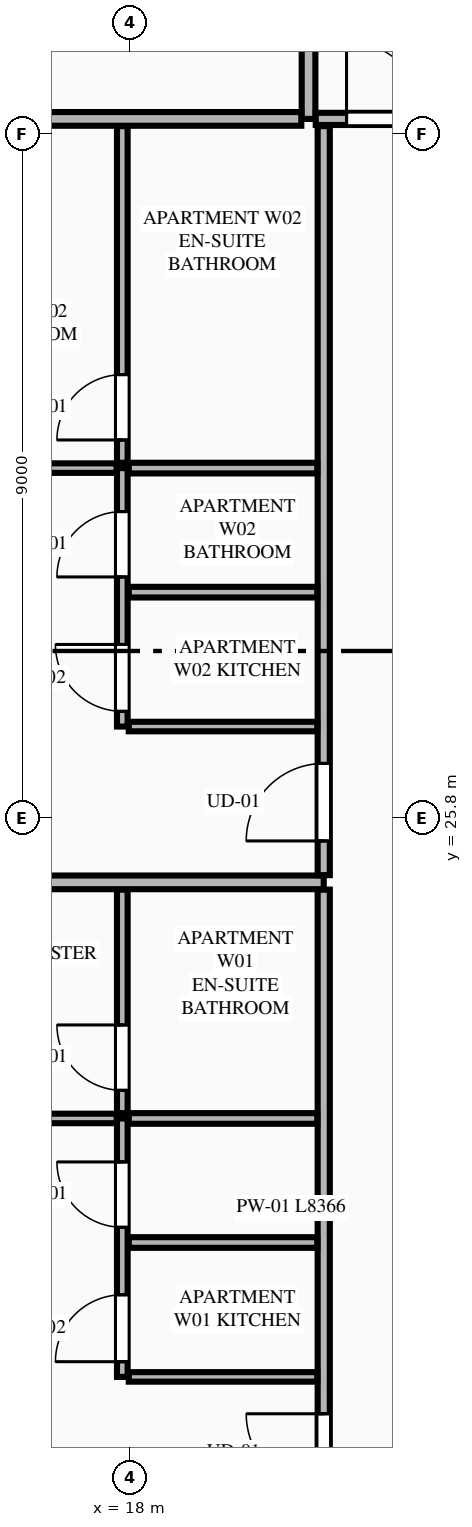
"""IFC4 building model, lengths in metres.
Left out: names, types, materials, properties, quantities, classifications, styles, units other than length and angle.
Written with IfcOpenShell. Run it as: python <this file> out.ifc"""

import sys

from ifc_helpers import new_model, si_unit, direction, frame, frame_2d, origin, place, context, subcontext, project, spatial, rectangle, extrude, element, fill, save


model = new_model("IFC4")
c1 = context("Model", 3, precision=1e-05, world=origin(), true_north=direction((0.0, 1.0)))
c2 = subcontext(c1, "Body", "Model", "MODEL_VIEW")
j1 = project(units=[si_unit("LENGTHUNIT", "METRE"), si_unit("PLANEANGLEUNIT", "RADIAN")], contexts=[c1])
p1 = place(None, origin())
s1 = spatial("IfcSite", under=j1, at=p1, CompositionType="ELEMENT")
p2 = place(p1, origin())
s2 = spatial("IfcBuilding", under=s1, at=p2, CompositionType="ELEMENT")
p3 = place(p2, frame((0.0, 0.0, 256.2)))
s3 = spatial("IfcBuildingStorey", under=s2, at=p3, CompositionType="ELEMENT", Elevation=256.2)
p4 = place(p3, frame((20.35, 35.0, 0.0), z_axis=(0.0, 0.0, 1.0), x_axis=(0.0, 1.0, 0.0)))
e1 = element("IfcWall", 1, at=p4, inside=s3, PredefinedType="PARTITIONING", context=c2, shape_type="SweptSolid", body=[
    extrude(rectangle(XDim=8.481, YDim=0.18, at=frame_2d((4.24, 0.0))), origin(), (0.0, 0.0, 1.0), 3.45),
])
p5 = place(p3, frame((20.445, 35.0, 0.0), z_axis=(0.0, 0.0, 1.0), x_axis=(1.0, 0.0, 0.0)))
e2 = element("IfcWall", 2, at=p5, inside=s3, PredefinedType="PARTITIONING", context=c2, shape_type="SweptSolid", body=[
    extrude(rectangle(XDim=15.114, YDim=0.16, at=frame_2d((7.557, 0.0))), origin(), (0.0, 0.0, 1.0), 3.45),
])
p6 = place(p5, frame((0.405, 0.0, 0.0)))
e3 = element("IfcOpeningElement", 3, at=p6, cuts=e2, PredefinedType="OPENING", context=c2, shape_type="SweptSolid", body=[
    extrude(rectangle(XDim=1.02, YDim=2.25, at=frame_2d((0.51, 1.125))), frame((0.0, 0.09, 0.0), z_axis=(0.0, -1.0, 0.0), x_axis=(1.0, 0.0, 0.0)), (0.0, 0.0, 1.0), 0.18),
])
p7 = place(p3, frame((15.933, 35.0, 0.0), z_axis=(0.0, 0.0, 1.0), x_axis=(1.0, 0.0, 0.0)))
e4 = element("IfcWall", 4, at=p7, inside=s3, PredefinedType="PARTITIONING", context=c2, shape_type="SweptSolid", body=[
    extrude(rectangle(XDim=4.322, YDim=0.18, at=frame_2d((2.161, 0.0))), origin(), (0.0, 0.0, 1.0), 3.45),
])
p8 = place(p3, frame((20.55, 16.495, 0.0), z_axis=(0.0, 0.0, 1.0), x_axis=(0.0, 1.0, 0.0)))
e5 = element("IfcWall", 5, at=p8, inside=s3, PredefinedType="PARTITIONING", context=c2, shape_type="SweptSolid", body=[
    extrude(rectangle(XDim=8.366, YDim=0.16, at=frame_2d((4.183, 0.0))), origin(), (0.0, 0.0, 1.0), 3.137),
])
p9 = place(p8, frame((0.45, 0.0, 0.0)))
e6 = element("IfcOpeningElement", 6, at=p9, cuts=e5, PredefinedType="OPENING", context=c2, shape_type="SweptSolid", body=[
    extrude(rectangle(XDim=1.02, YDim=2.25, at=frame_2d((0.51, 1.125))), frame((0.0, 0.09, 0.0), z_axis=(0.0, -1.0, 0.0), x_axis=(1.0, 0.0, 0.0)), (0.0, 0.0, 1.0), 0.18),
])
p10 = place(p3, frame((17.985, 18.45, 0.0), z_axis=(0.0, 0.0, 1.0), x_axis=(1.0, 0.0, 0.0)))
e7 = element("IfcWall", 7, at=p10, inside=s3, PredefinedType="PARTITIONING", context=c2, shape_type="SweptSolid", body=[
    extrude(rectangle(XDim=2.48, YDim=0.125, at=frame_2d((1.24, 0.0))), origin(), (0.0, 0.0, 1.0), 3.45),
])
p11 = place(p3, frame((17.9, 18.45, 0.0), z_axis=(0.0, 0.0, 1.0), x_axis=(0.0, 1.0, 0.0)))
e8 = element("IfcWall", 8, at=p11, inside=s3, PredefinedType="PLUMBINGWALL", context=c2, shape_type="SweptSolid", body=[
    extrude(rectangle(XDim=3.4, YDim=0.14, at=frame_2d((1.7, 0.0))), origin(), (0.0, 0.0, 1.0), 3.45),
])
p12 = place(p11, frame((0.2, 0.0, 0.0)))
e9 = element("IfcOpeningElement", 9, at=p12, cuts=e8, PredefinedType="OPENING", context=c2, shape_type="SweptSolid", body=[
    extrude(rectangle(XDim=0.88, YDim=2.15, at=frame_2d((0.44, 1.075))), frame((0.0, 0.08, 0.0), z_axis=(0.0, -1.0, 0.0), x_axis=(1.0, 0.0, 0.0)), (0.0, 0.0, 1.0), 0.16),
])
p13 = place(p11, frame((1.968, 0.0, 0.0)))
e10 = element("IfcOpeningElement", 10, at=p13, cuts=e8, PredefinedType="OPENING", context=c2, shape_type="SweptSolid", body=[
    extrude(rectangle(XDim=0.86, YDim=2.1, at=frame_2d((0.43, 1.05))), frame((0.0, 0.08, 0.0), z_axis=(0.0, -1.0, 0.0), x_axis=(1.0, 0.0, 0.0)), (0.0, 0.0, 1.0), 0.16),
])
p14 = place(p3, frame((17.9, 21.92, 0.0), z_axis=(0.0, 0.0, 1.0), x_axis=(0.0, 1.0, 0.0)))
e11 = element("IfcWall", 11, at=p14, inside=s3, PredefinedType="PLUMBINGWALL", context=c2, shape_type="SweptSolid", body=[
    extrude(rectangle(XDim=2.941, YDim=0.14, at=frame_2d((1.471, 0.0))), origin(), (0.0, 0.0, 1.0), 3.45),
])
p15 = place(p14, frame((0.3, 0.0, 0.0)))
e12 = element("IfcOpeningElement", 12, at=p15, cuts=e11, PredefinedType="OPENING", context=c2, shape_type="SweptSolid", body=[
    extrude(rectangle(XDim=0.86, YDim=2.1, at=frame_2d((0.43, 1.05))), frame((0.0, 0.08, 0.0), z_axis=(0.0, -1.0, 0.0), x_axis=(1.0, 0.0, 0.0)), (0.0, 0.0, 1.0), 0.16),
])
p16 = place(p3, frame((17.985, 21.85, 0.0), z_axis=(0.0, 0.0, 1.0), x_axis=(1.0, 0.0, 0.0)))
e13 = element("IfcWall", 13, at=p16, inside=s3, PredefinedType="PLUMBINGWALL", context=c2, shape_type="SweptSolid", body=[
    extrude(rectangle(XDim=2.48, YDim=0.14, at=frame_2d((1.24, 0.0))), origin(), (0.0, 0.0, 1.0), 3.45),
])
p17 = place(p3, frame((13.262, 21.85, 0.0), z_axis=(0.0, 0.0, 1.0), x_axis=(1.0, 0.0, 0.0)))
e14 = element("IfcWall", 14, at=p17, inside=s3, PredefinedType="PARTITIONING", context=c2, shape_type="SweptSolid", body=[
    extrude(rectangle(XDim=4.563, YDim=0.125, at=frame_2d((2.281, 0.0))), origin(), (0.0, 0.0, 1.0), 3.45),
])
p18 = place(p17, frame((0.35, 0.0, 0.0)))
e15 = element("IfcOpeningElement", 15, at=p18, cuts=e14, PredefinedType="OPENING", context=c2, shape_type="SweptSolid", body=[
    extrude(rectangle(XDim=0.92, YDim=2.15, at=frame_2d((0.46, 1.075))), frame((0.0, 0.073, 0.0), z_axis=(0.0, -1.0, 0.0), x_axis=(1.0, 0.0, 0.0)), (0.0, 0.0, 1.0), 0.145),
])
p19 = place(p3, frame((17.985, 20.218, 0.0), z_axis=(0.0, 0.0, 1.0), x_axis=(1.0, 0.0, 0.0)))
e16 = element("IfcWall", 16, at=p19, inside=s3, PredefinedType="PLUMBINGWALL", context=c2, shape_type="SweptSolid", body=[
    extrude(rectangle(XDim=2.48, YDim=0.14, at=frame_2d((1.24, 0.0))), origin(), (0.0, 0.0, 1.0), 3.45),
])
p20 = place(p3, frame((11.707, 24.956, 0.0), z_axis=(0.0, 0.0, 1.0), x_axis=(1.0, 0.0, 0.0)))
e17 = element("IfcWall", 17, at=p20, inside=s3, PredefinedType="PARTITIONING", context=c2, shape_type="SweptSolid", body=[
    extrude(rectangle(XDim=8.843, YDim=0.18, at=frame_2d((4.421, 0.0))), origin(), (0.0, 0.0, 1.0), 3.45),
])
p21 = place(p3, frame((20.55, 25.051, 0.0), z_axis=(0.0, 0.0, 1.0), x_axis=(0.0, 1.0, 0.0)))
e18 = element("IfcWall", 18, at=p21, inside=s3, PredefinedType="PARTITIONING", context=c2, shape_type="SweptSolid", body=[
    extrude(rectangle(XDim=9.854, YDim=0.16, at=frame_2d((4.927, 0.0))), origin(), (0.0, 0.0, 1.0), 3.137),
])
p22 = place(p21, frame((0.45, 0.0, 0.0)))
e19 = element("IfcOpeningElement", 19, at=p22, cuts=e18, PredefinedType="OPENING", context=c2, shape_type="SweptSolid", body=[
    extrude(rectangle(XDim=1.02, YDim=2.25, at=frame_2d((0.51, 1.125))), frame((0.0, 0.09, 0.0), z_axis=(0.0, -1.0, 0.0), x_axis=(1.0, 0.0, 0.0)), (0.0, 0.0, 1.0), 0.18),
])
p23 = place(p3, frame((17.985, 27.006, 0.0), z_axis=(0.0, 0.0, 1.0), x_axis=(1.0, 0.0, 0.0)))
e20 = element("IfcWall", 20, at=p23, inside=s3, PredefinedType="PARTITIONING", context=c2, shape_type="SweptSolid", body=[
    extrude(rectangle(XDim=2.48, YDim=0.125, at=frame_2d((1.24, 0.0))), origin(), (0.0, 0.0, 1.0), 3.45),
])
p24 = place(p3, frame((17.9, 27.006, 0.0), z_axis=(0.0, 0.0, 1.0), x_axis=(0.0, 1.0, 0.0)))
e21 = element("IfcWall", 21, at=p24, inside=s3, PredefinedType="PLUMBINGWALL", context=c2, shape_type="SweptSolid", body=[
    extrude(rectangle(XDim=3.4, YDim=0.14, at=frame_2d((1.7, 0.0))), origin(), (0.0, 0.0, 1.0), 3.45),
])
p25 = place(p24, frame((0.2, 0.0, 0.0)))
e22 = element("IfcOpeningElement", 22, at=p25, cuts=e21, PredefinedType="OPENING", context=c2, shape_type="SweptSolid", body=[
    extrude(rectangle(XDim=0.88, YDim=2.15, at=frame_2d((0.44, 1.075))), frame((0.0, 0.08, 0.0), z_axis=(0.0, -1.0, 0.0), x_axis=(1.0, 0.0, 0.0)), (0.0, 0.0, 1.0), 0.16),
])
p26 = place(p24, frame((1.968, 0.0, 0.0)))
e23 = element("IfcOpeningElement", 23, at=p26, cuts=e21, PredefinedType="OPENING", context=c2, shape_type="SweptSolid", body=[
    extrude(rectangle(XDim=0.86, YDim=2.1, at=frame_2d((0.43, 1.05))), frame((0.0, 0.08, 0.0), z_axis=(0.0, -1.0, 0.0), x_axis=(1.0, 0.0, 0.0)), (0.0, 0.0, 1.0), 0.16),
])
p27 = place(p3, frame((17.9, 30.476, 0.0), z_axis=(0.0, 0.0, 1.0), x_axis=(0.0, 1.0, 0.0)))
e24 = element("IfcWall", 24, at=p27, inside=s3, PredefinedType="PLUMBINGWALL", context=c2, shape_type="SweptSolid", body=[
    extrude(rectangle(XDim=4.429, YDim=0.14, at=frame_2d((2.214, 0.0))), origin(), (0.0, 0.0, 1.0), 3.45),
])
p28 = place(p27, frame((0.3, 0.0, 0.0)))
e25 = element("IfcOpeningElement", 25, at=p28, cuts=e24, PredefinedType="OPENING", context=c2, shape_type="SweptSolid", body=[
    extrude(rectangle(XDim=0.86, YDim=2.1, at=frame_2d((0.43, 1.05))), frame((0.0, 0.08, 0.0), z_axis=(0.0, -1.0, 0.0), x_axis=(1.0, 0.0, 0.0)), (0.0, 0.0, 1.0), 0.16),
])
p29 = place(p3, frame((17.985, 30.406, 0.0), z_axis=(0.0, 0.0, 1.0), x_axis=(1.0, 0.0, 0.0)))
e26 = element("IfcWall", 26, at=p29, inside=s3, PredefinedType="PLUMBINGWALL", context=c2, shape_type="SweptSolid", body=[
    extrude(rectangle(XDim=2.48, YDim=0.14, at=frame_2d((1.24, 0.0))), origin(), (0.0, 0.0, 1.0), 3.45),
])
p30 = place(p3, frame((13.594, 30.406, 0.0), z_axis=(0.0, 0.0, 1.0), x_axis=(1.0, 0.0, 0.0)))
e27 = element("IfcWall", 27, at=p30, inside=s3, PredefinedType="PARTITIONING", context=c2, shape_type="SweptSolid", body=[
    extrude(rectangle(XDim=4.231, YDim=0.125, at=frame_2d((2.115, 0.0))), origin(), (0.0, 0.0, 1.0), 3.45),
])
p31 = place(p30, frame((0.35, 0.0, 0.0)))
e28 = element("IfcOpeningElement", 28, at=p31, cuts=e27, PredefinedType="OPENING", context=c2, shape_type="SweptSolid", body=[
    extrude(rectangle(XDim=0.92, YDim=2.15, at=frame_2d((0.46, 1.075))), frame((0.0, 0.073, 0.0), z_axis=(0.0, -1.0, 0.0), x_axis=(1.0, 0.0, 0.0)), (0.0, 0.0, 1.0), 0.145),
])
p32 = place(p3, frame((17.985, 28.774, 0.0), z_axis=(0.0, 0.0, 1.0), x_axis=(1.0, 0.0, 0.0)))
e29 = element("IfcWall", 29, at=p32, inside=s3, PredefinedType="PLUMBINGWALL", context=c2, shape_type="SweptSolid", body=[
    extrude(rectangle(XDim=2.48, YDim=0.14, at=frame_2d((1.24, 0.0))), origin(), (0.0, 0.0, 1.0), 3.45),
])
p33 = place(p6, origin())
e30 = element("IfcDoor", 30, at=p33, inside=s3, OperationType="SINGLE_SWING_LEFT", PredefinedType="DOOR", context=c2, shape_type="SweptSolid", body=[
    extrude(rectangle(XDim=1.02, YDim=2.25, at=frame_2d((0.51, 1.125))), frame((0.0, 0.025, 0.0), z_axis=(0.0, -1.0, 0.0), x_axis=(1.0, 0.0, 0.0)), (0.0, 0.0, 1.0), 0.05),
])
fill(e3, e30)
p34 = place(p12, origin())
e31 = element("IfcDoor", 31, at=p34, inside=s3, OperationType="SINGLE_SWING_LEFT", PredefinedType="DOOR", context=c2, shape_type="SweptSolid", body=[
    extrude(rectangle(XDim=0.88, YDim=2.15, at=frame_2d((0.44, 1.075))), frame((0.0, 0.025, 0.0), z_axis=(0.0, -1.0, 0.0), x_axis=(1.0, 0.0, 0.0)), (0.0, 0.0, 1.0), 0.05),
])
fill(e9, e31)
p35 = place(p13, origin())
e32 = element("IfcDoor", 32, at=p35, inside=s3, OperationType="SINGLE_SWING_RIGHT", PredefinedType="DOOR", context=c2, shape_type="SweptSolid", body=[
    extrude(rectangle(XDim=0.86, YDim=2.1, at=frame_2d((0.43, 1.05))), frame((0.0, 0.025, 0.0), z_axis=(0.0, -1.0, 0.0), x_axis=(1.0, 0.0, 0.0)), (0.0, 0.0, 1.0), 0.05),
])
fill(e10, e32)
p36 = place(p15, origin())
e33 = element("IfcDoor", 33, at=p36, inside=s3, OperationType="SINGLE_SWING_RIGHT", PredefinedType="DOOR", context=c2, shape_type="SweptSolid", body=[
    extrude(rectangle(XDim=0.86, YDim=2.1, at=frame_2d((0.43, 1.05))), frame((0.0, 0.025, 0.0), z_axis=(0.0, -1.0, 0.0), x_axis=(1.0, 0.0, 0.0)), (0.0, 0.0, 1.0), 0.05),
])
fill(e12, e33)
p37 = place(p9, origin())
e34 = element("IfcDoor", 34, at=p37, inside=s3, OperationType="SINGLE_SWING_RIGHT", PredefinedType="DOOR", context=c2, shape_type="SweptSolid", body=[
    extrude(rectangle(XDim=1.02, YDim=2.25, at=frame_2d((0.51, 1.125))), frame((0.0, 0.025, 0.0), z_axis=(0.0, -1.0, 0.0), x_axis=(1.0, 0.0, 0.0)), (0.0, 0.0, 1.0), 0.05),
])
fill(e6, e34)
p38 = place(p25, origin())
e35 = element("IfcDoor", 35, at=p38, inside=s3, OperationType="SINGLE_SWING_RIGHT", PredefinedType="DOOR", context=c2, shape_type="SweptSolid", body=[
    extrude(rectangle(XDim=0.88, YDim=2.15, at=frame_2d((0.44, 1.075))), frame((0.0, 0.025, 0.0), z_axis=(0.0, -1.0, 0.0), x_axis=(1.0, 0.0, 0.0)), (0.0, 0.0, 1.0), 0.05),
])
fill(e22, e35)
p39 = place(p26, origin())
e36 = element("IfcDoor", 36, at=p39, inside=s3, OperationType="SINGLE_SWING_LEFT", PredefinedType="DOOR", context=c2, shape_type="SweptSolid", body=[
    extrude(rectangle(XDim=0.86, YDim=2.1, at=frame_2d((0.43, 1.05))), frame((0.0, 0.025, 0.0), z_axis=(0.0, -1.0, 0.0), x_axis=(1.0, 0.0, 0.0)), (0.0, 0.0, 1.0), 0.05),
])
fill(e23, e36)
p40 = place(p28, origin())
e37 = element("IfcDoor", 37, at=p40, inside=s3, OperationType="SINGLE_SWING_LEFT", PredefinedType="DOOR", context=c2, shape_type="SweptSolid", body=[
    extrude(rectangle(XDim=0.86, YDim=2.1, at=frame_2d((0.43, 1.05))), frame((0.0, 0.025, 0.0), z_axis=(0.0, -1.0, 0.0), x_axis=(1.0, 0.0, 0.0)), (0.0, 0.0, 1.0), 0.05),
])
fill(e25, e37)
p41 = place(p22, origin())
e38 = element("IfcDoor", 38, at=p41, inside=s3, OperationType="SINGLE_SWING_LEFT", PredefinedType="DOOR", context=c2, shape_type="SweptSolid", body=[
    extrude(rectangle(XDim=1.02, YDim=2.25, at=frame_2d((0.51, 1.125))), frame((0.0, 0.025, 0.0), z_axis=(0.0, -1.0, 0.0), x_axis=(1.0, 0.0, 0.0)), (0.0, 0.0, 1.0), 0.05),
])
fill(e19, e38)
save(model, sys.argv[1])
